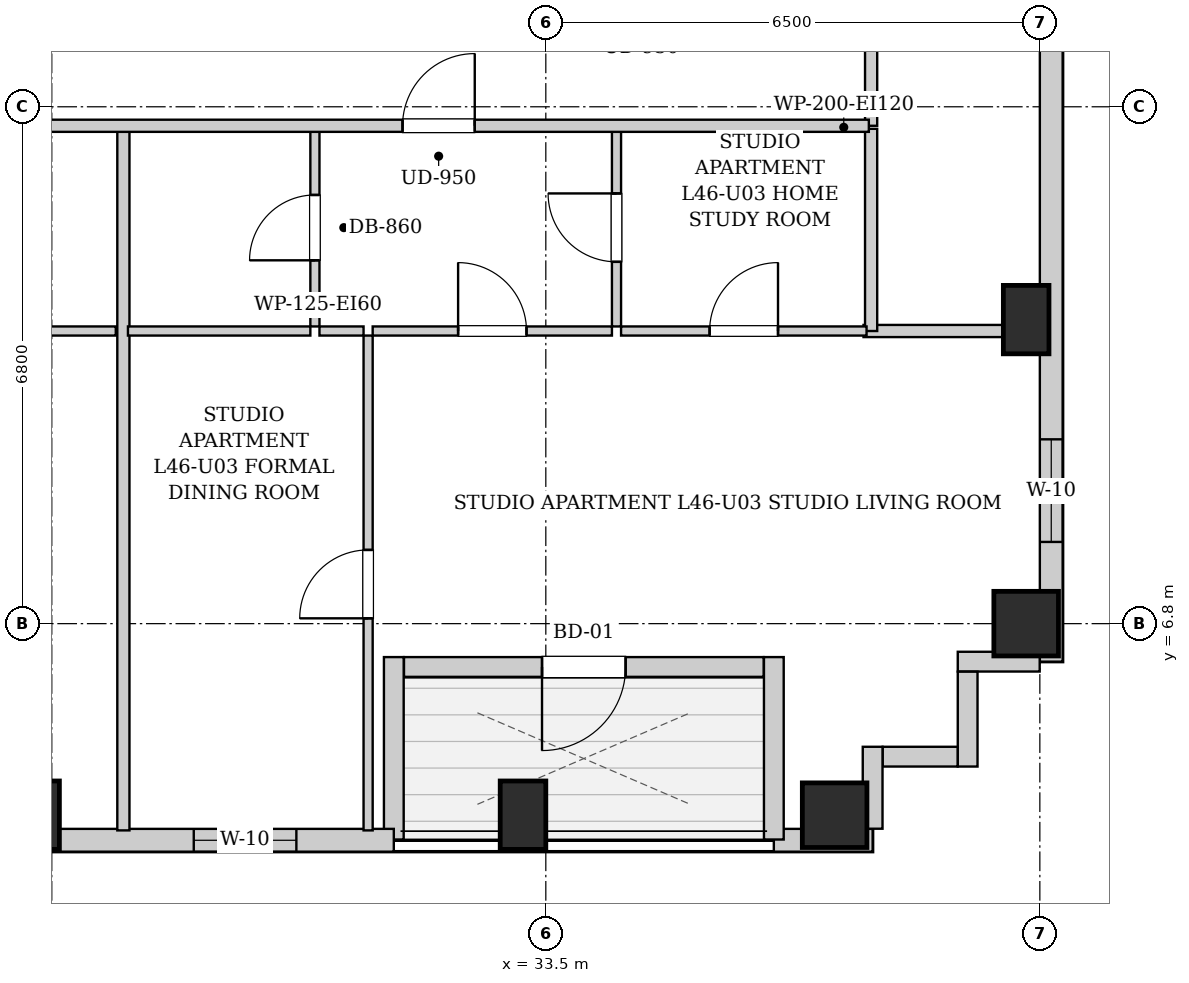
"""IFC4 building model, lengths in metres.
Left out: names, types, materials, properties, quantities, classifications, styles, units other than length and angle.
Written with IfcOpenShell. Run it as: python <this file> out.ifc"""

import sys

from ifc_helpers import new_model, si_unit, direction, frame, frame_2d, origin, origin_2d, place, context, subcontext, project, spatial, rectangle, extrude, element, fill, save


model = new_model("IFC4")
c1 = context("Model", 3, precision=1e-05, world=origin(), true_north=direction((0.0, 1.0)))
c2 = subcontext(c1, "Body", "Model", "MODEL_VIEW")
j1 = project(units=[si_unit("LENGTHUNIT", "METRE"), si_unit("PLANEANGLEUNIT", "RADIAN")], contexts=[c1])
p1 = place(None, origin())
s1 = spatial("IfcSite", under=j1, at=p1, CompositionType="ELEMENT")
p2 = place(p1, origin())
s2 = spatial("IfcBuilding", under=s1, at=p2, CompositionType="ELEMENT")
p3 = place(p2, frame((0.0, 0.0, 160.15)))
s3 = spatial("IfcBuildingStorey", under=s2, at=p3, CompositionType="ELEMENT", Elevation=160.15)
for number, where, z_axis, x_axis in (
    (1, (26.8, 4.28, 0.0), (0.0, 0.0, 1.0), (1.0, 0.0, 0.0)),
    (2, (33.2, 4.28, 0.0), (0.0, 0.0, 1.0), (1.0, 0.0, 0.0)),
):
    element("IfcColumn", number, at=place(p3, frame(where, z_axis=z_axis, x_axis=x_axis)), inside=s3, PredefinedType="COLUMN", context=c2, shape_type="SweptSolid", body=[
        extrude(rectangle(XDim=0.6, YDim=0.9, at=origin_2d()), origin(), (0.0, 0.0, 1.0), 3.25),
    ])
for number, where, z_axis, x_axis in (
    (3, (37.3, 4.28, 0.0), (0.0, 0.0, 1.0), (1.0, 0.0, 0.0)),
    (4, (39.82, 6.8, 0.0), (0.0, 0.0, 1.0), (1.0, 0.0, 0.0)),
):
    element("IfcColumn", number, at=place(p3, frame(where, z_axis=z_axis, x_axis=x_axis)), inside=s3, PredefinedType="COLUMN", context=c2, shape_type="SweptSolid", body=[
        extrude(rectangle(XDim=0.85, YDim=0.85, at=origin_2d()), origin(), (0.0, 0.0, 1.0), 3.25),
    ])
p4 = place(p3, frame((39.82, 10.8, 0.0), z_axis=(0.0, 0.0, 1.0), x_axis=(1.0, 0.0, 0.0)))
e5 = element("IfcColumn", 5, at=p4, inside=s3, PredefinedType="COLUMN", context=c2, shape_type="SweptSolid", body=[
    extrude(rectangle(XDim=0.6, YDim=0.9, at=origin_2d()), origin(), (0.0, 0.0, 1.0), 3.25),
])
p5 = place(p3, frame((40.15, 40.8, 0.0), z_axis=(0.0, 0.0, 1.0), x_axis=(0.0, -1.0, 0.0)))
e6 = element("IfcWall", 6, at=p5, inside=s3, PredefinedType="SOLIDWALL", context=c2, shape_type="SweptSolid", body=[
    extrude(rectangle(XDim=34.5, YDim=0.3, at=frame_2d((17.25, 0.0))), origin(), (0.0, 0.0, 1.0), 2.99),
])
p6 = place(p5, frame((31.575, 0.0, 0.55)))
e7 = element("IfcOpeningElement", 7, at=p6, cuts=e6, PredefinedType="OPENING", context=c2, shape_type="SweptSolid", body=[
    extrude(rectangle(XDim=1.35, YDim=1.2, at=frame_2d((0.675, 0.6))), frame((0.0, 0.16, 0.0), z_axis=(0.0, -1.0, 0.0), x_axis=(1.0, 0.0, 0.0)), (0.0, 0.0, 1.0), 0.32),
])
p7 = place(p5, frame((3.075, 0.0, 0.55)))
e8 = element("IfcOpeningElement", 8, at=p7, cuts=e6, PredefinedType="OPENING", context=c2, shape_type="SweptSolid", body=[
    extrude(rectangle(XDim=1.35, YDim=1.2, at=frame_2d((0.675, 0.6))), frame((0.0, 0.16, 0.0), z_axis=(0.0, -1.0, 0.0), x_axis=(1.0, 0.0, 0.0)), (0.0, 0.0, 1.0), 0.32),
])
p8 = place(p5, frame((1.085, 0.0, 0.55)))
e9 = element("IfcOpeningElement", 9, at=p8, cuts=e6, PredefinedType="OPENING", context=c2, shape_type="SweptSolid", body=[
    extrude(rectangle(XDim=1.35, YDim=1.2, at=frame_2d((0.675, 0.6))), frame((0.0, 0.16, 0.0), z_axis=(0.0, -1.0, 0.0), x_axis=(1.0, 0.0, 0.0)), (0.0, 0.0, 1.0), 0.32),
])
p9 = place(p5, frame((22.8, 0.0, 0.55)))
e10 = element("IfcOpeningElement", 10, at=p9, cuts=e6, PredefinedType="OPENING", context=c2, shape_type="SweptSolid", body=[
    extrude(rectangle(XDim=1.35, YDim=1.2, at=frame_2d((0.675, 0.6))), frame((0.0, 0.16, 0.0), z_axis=(0.0, -1.0, 0.0), x_axis=(1.0, 0.0, 0.0)), (0.0, 0.0, 1.0), 0.32),
])
p10 = place(p5, frame((13.425, 0.0, 0.55)))
e11 = element("IfcOpeningElement", 11, at=p10, cuts=e6, PredefinedType="OPENING", context=c2, shape_type="SweptSolid", body=[
    extrude(rectangle(XDim=1.35, YDim=1.2, at=frame_2d((0.675, 0.6))), frame((0.0, 0.16, 0.0), z_axis=(0.0, -1.0, 0.0), x_axis=(1.0, 0.0, 0.0)), (0.0, 0.0, 1.0), 0.32),
])
p11 = place(p3, frame((37.8, 3.95, 0.0), z_axis=(0.0, 0.0, 1.0), x_axis=(-1.0, 0.0, 0.0)))
e12 = element("IfcWall", 12, at=p11, inside=s3, PredefinedType="SOLIDWALL", context=c2, shape_type="SweptSolid", body=[
    extrude(rectangle(XDim=1.3, YDim=0.3, at=frame_2d((0.65, 0.0))), origin(), (0.0, 0.0, 1.0), 2.99),
])
p12 = place(p3, frame((36.5, 3.96, 0.0), z_axis=(0.0, 0.0, 1.0), x_axis=(0.0, 1.0, 0.0)))
e13 = element("IfcWall", 13, at=p12, inside=s3, PredefinedType="SOLIDWALL", context=c2, shape_type="SweptSolid", body=[
    extrude(rectangle(XDim=2.4, YDim=0.26, at=frame_2d((1.2, 0.0))), origin(), (0.0, 0.0, 1.0), 2.99),
])
p13 = place(p3, frame((36.366, 6.23, 0.0), z_axis=(0.0, 0.0, 1.0), x_axis=(-1.0, 0.0, 0.0)))
e14 = element("IfcWall", 14, at=p13, inside=s3, PredefinedType="SOLIDWALL", context=c2, shape_type="SweptSolid", body=[
    extrude(rectangle(XDim=4.732, YDim=0.26, at=frame_2d((2.366, 0.0))), origin(), (0.0, 0.0, 1.0), 2.99),
])
p14 = place(p13, frame((1.816, 0.0, 0.0)))
e15 = element("IfcOpeningElement", 15, at=p14, cuts=e14, PredefinedType="OPENING", context=c2, shape_type="SweptSolid", body=[
    extrude(rectangle(XDim=1.1, YDim=2.0, at=frame_2d((0.55, 1.0))), frame((0.0, 0.14, 0.0), z_axis=(0.0, -1.0, 0.0), x_axis=(1.0, 0.0, 0.0)), (0.0, 0.0, 1.0), 0.28),
])
p15 = place(p3, frame((31.5, 6.36, 0.0), z_axis=(0.0, 0.0, 1.0), x_axis=(0.0, -1.0, 0.0)))
e16 = element("IfcWall", 16, at=p15, inside=s3, PredefinedType="SOLIDWALL", context=c2, shape_type="SweptSolid", body=[
    extrude(rectangle(XDim=2.4, YDim=0.26, at=frame_2d((1.2, 0.0))), origin(), (0.0, 0.0, 1.0), 2.99),
])
p16 = place(p3, frame((31.5, 3.95, 0.0), z_axis=(0.0, 0.0, 1.0), x_axis=(-1.0, 0.0, 0.0)))
e17 = element("IfcWall", 17, at=p16, inside=s3, PredefinedType="SOLIDWALL", context=c2, shape_type="SweptSolid", body=[
    extrude(rectangle(XDim=15.05, YDim=0.3, at=frame_2d((7.525, 0.0))), origin(), (0.0, 0.0, 1.0), 2.99),
])
p17 = place(p16, frame((10.989, 0.0, 0.55)))
e18 = element("IfcOpeningElement", 18, at=p17, cuts=e17, PredefinedType="OPENING", context=c2, shape_type="SweptSolid", body=[
    extrude(rectangle(XDim=1.35, YDim=1.2, at=frame_2d((0.675, 0.6))), frame((0.0, 0.16, 0.0), z_axis=(0.0, -1.0, 0.0), x_axis=(1.0, 0.0, 0.0)), (0.0, 0.0, 1.0), 0.32),
])
p18 = place(p16, frame((1.282, 0.0, 0.55)))
e19 = element("IfcOpeningElement", 19, at=p18, cuts=e17, PredefinedType="OPENING", context=c2, shape_type="SweptSolid", body=[
    extrude(rectangle(XDim=1.35, YDim=1.2, at=frame_2d((0.675, 0.6))), frame((0.0, 0.16, 0.0), z_axis=(0.0, -1.0, 0.0), x_axis=(1.0, 0.0, 0.0)), (0.0, 0.0, 1.0), 0.32),
])
p19 = place(p3, frame((39.998, 6.3, 0.0), z_axis=(0.0, 0.0, 1.0), x_axis=(-1.0, 0.0, 0.0)))
e20 = element("IfcWall", 20, at=p19, inside=s3, PredefinedType="SOLIDWALL", context=c2, shape_type="SweptSolid", body=[
    extrude(rectangle(XDim=1.078, YDim=0.26, at=frame_2d((0.539, 0.0))), origin(), (0.0, 0.0, 1.0), 2.99),
])
p20 = place(p3, frame((39.05, 6.168, 0.0), z_axis=(0.0, 0.0, 1.0), x_axis=(0.0, -1.0, 0.0)))
e21 = element("IfcWall", 21, at=p20, inside=s3, PredefinedType="SOLIDWALL", context=c2, shape_type="SweptSolid", body=[
    extrude(rectangle(XDim=1.248, YDim=0.26, at=frame_2d((0.624, 0.0))), origin(), (0.0, 0.0, 1.0), 2.99),
])
p21 = place(p3, frame((38.918, 5.05, 0.0), z_axis=(0.0, 0.0, 1.0), x_axis=(-1.0, 0.0, 0.0)))
e22 = element("IfcWall", 22, at=p21, inside=s3, PredefinedType="SOLIDWALL", context=c2, shape_type="SweptSolid", body=[
    extrude(rectangle(XDim=0.986, YDim=0.26, at=frame_2d((0.493, 0.0))), origin(), (0.0, 0.0, 1.0), 2.99),
])
p22 = place(p3, frame((37.8, 5.18, 0.0), z_axis=(0.0, 0.0, 1.0), x_axis=(0.0, -1.0, 0.0)))
e23 = element("IfcWall", 23, at=p22, inside=s3, PredefinedType="SOLIDWALL", context=c2, shape_type="SweptSolid", body=[
    extrude(rectangle(XDim=1.078, YDim=0.26, at=frame_2d((0.539, 0.0))), origin(), (0.0, 0.0, 1.0), 2.99),
])
p23 = place(p3, frame((37.78, 13.35, 0.0), z_axis=(0.0, 0.0, 1.0), x_axis=(0.0, 1.0, 0.0)))
e24 = element("IfcWall", 24, at=p23, inside=s3, PredefinedType="PARTITIONING", context=c2, shape_type="SweptSolid", body=[
    extrude(rectangle(XDim=1.74, YDim=0.16, at=frame_2d((0.87, 0.0))), origin(), (0.0, 0.0, 1.0), 2.99),
])
p24 = place(p3, frame((23.938, 10.65, 0.0), z_axis=(0.0, 0.0, 1.0), x_axis=(1.0, 0.0, 0.0)))
e25 = element("IfcWall", 25, at=p24, inside=s3, PredefinedType="PARTITIONING", context=c2, shape_type="SweptSolid", body=[
    extrude(rectangle(XDim=3.904, YDim=0.12, at=frame_2d((1.952, 0.0))), origin(), (0.0, 0.0, 1.0), 2.99),
])
p25 = place(p24, frame((1.502, 0.0, 0.0)))
e26 = element("IfcOpeningElement", 26, at=p25, cuts=e25, PredefinedType="OPENING", context=c2, shape_type="SweptSolid", body=[
    extrude(rectangle(XDim=0.9, YDim=2.05, at=frame_2d((0.45, 1.025))), frame((0.0, 0.07, 0.0), z_axis=(0.0, -1.0, 0.0), x_axis=(1.0, 0.0, 0.0)), (0.0, 0.0, 1.0), 0.14),
])
p26 = place(p3, frame((37.68, 10.65, 0.0), z_axis=(0.0, 0.0, 1.0), x_axis=(1.0, 0.0, 0.0)))
e27 = element("IfcWall", 27, at=p26, inside=s3, PredefinedType="PARTITIONING", context=c2, shape_type="SweptSolid", body=[
    extrude(rectangle(XDim=2.34, YDim=0.16, at=frame_2d((1.17, 0.0))), origin(), (0.0, 0.0, 1.0), 2.99),
])
p27 = place(p3, frame((37.78, 10.65, 0.0), z_axis=(0.0, 0.0, 1.0), x_axis=(0.0, 1.0, 0.0)))
e28 = element("IfcWall", 28, at=p27, inside=s3, PredefinedType="PARTITIONING", context=c2, shape_type="SweptSolid", body=[
    extrude(rectangle(XDim=2.66, YDim=0.16, at=frame_2d((1.33, 0.0))), origin(), (0.0, 0.0, 1.0), 2.99),
])
p28 = place(p3, frame((27.942, 4.08, 0.0), z_axis=(0.0, 0.0, 1.0), x_axis=(0.0, 1.0, 0.0)))
e29 = element("IfcWall", 29, at=p28, inside=s3, PredefinedType="PARTITIONING", context=c2, shape_type="SweptSolid", body=[
    extrude(rectangle(XDim=9.23, YDim=0.16, at=frame_2d((4.615, 0.0))), origin(), (0.0, 0.0, 1.0), 2.99),
])
p29 = place(p3, frame((30.462, 10.71, 0.0), z_axis=(0.0, 0.0, 1.0), x_axis=(0.0, 1.0, 0.0)))
e30 = element("IfcWall", 30, at=p29, inside=s3, PredefinedType="PARTITIONING", context=c2, shape_type="SweptSolid", body=[
    extrude(rectangle(XDim=2.6, YDim=0.12, at=frame_2d((1.3, 0.0))), origin(), (0.0, 0.0, 1.0), 2.99),
])
p30 = place(p29, frame((0.87, 0.0, 0.0)))
e31 = element("IfcOpeningElement", 31, at=p30, cuts=e30, PredefinedType="OPENING", context=c2, shape_type="SweptSolid", body=[
    extrude(rectangle(XDim=0.86, YDim=2.05, at=frame_2d((0.43, 1.025))), frame((0.0, 0.07, 0.0), z_axis=(0.0, -1.0, 0.0), x_axis=(1.0, 0.0, 0.0)), (0.0, 0.0, 1.0), 0.14),
])
p31 = place(p3, frame((28.002, 10.65, 0.0), z_axis=(0.0, 0.0, 1.0), x_axis=(1.0, 0.0, 0.0)))
e32 = element("IfcWall", 32, at=p31, inside=s3, PredefinedType="PARTITIONING", context=c2, shape_type="SweptSolid", body=[
    extrude(rectangle(XDim=2.4, YDim=0.12, at=frame_2d((1.2, 0.0))), origin(), (0.0, 0.0, 1.0), 2.99),
])
p32 = place(p3, frame((34.43, 10.71, 0.0), z_axis=(0.0, 0.0, 1.0), x_axis=(0.0, 1.0, 0.0)))
e33 = element("IfcWall", 33, at=p32, inside=s3, PredefinedType="PARTITIONING", context=c2, shape_type="SweptSolid", body=[
    extrude(rectangle(XDim=2.6, YDim=0.12, at=frame_2d((1.3, 0.0))), origin(), (0.0, 0.0, 1.0), 2.99),
])
p33 = place(p32, frame((0.85, 0.0, 0.0)))
e34 = element("IfcOpeningElement", 34, at=p33, cuts=e33, PredefinedType="OPENING", context=c2, shape_type="SweptSolid", body=[
    extrude(rectangle(XDim=0.9, YDim=2.05, at=frame_2d((0.45, 1.025))), frame((0.0, 0.07, 0.0), z_axis=(0.0, -1.0, 0.0), x_axis=(1.0, 0.0, 0.0)), (0.0, 0.0, 1.0), 0.14),
])
p34 = place(p3, frame((30.522, 10.65, 0.0), z_axis=(0.0, 0.0, 1.0), x_axis=(1.0, 0.0, 0.0)))
e35 = element("IfcWall", 35, at=p34, inside=s3, PredefinedType="PARTITIONING", context=c2, shape_type="SweptSolid", body=[
    extrude(rectangle(XDim=0.58, YDim=0.12, at=frame_2d((0.29, 0.0))), origin(), (0.0, 0.0, 1.0), 2.99),
])
p35 = place(p3, frame((31.222, 10.65, 0.0), z_axis=(0.0, 0.0, 1.0), x_axis=(1.0, 0.0, 0.0)))
e36 = element("IfcWall", 36, at=p35, inside=s3, PredefinedType="PARTITIONING", context=c2, shape_type="SweptSolid", body=[
    extrude(rectangle(XDim=3.148, YDim=0.12, at=frame_2d((1.574, 0.0))), origin(), (0.0, 0.0, 1.0), 2.99),
])
p36 = place(p35, frame((1.124, 0.0, 0.0)))
e37 = element("IfcOpeningElement", 37, at=p36, cuts=e36, PredefinedType="OPENING", context=c2, shape_type="SweptSolid", body=[
    extrude(rectangle(XDim=0.9, YDim=2.05, at=frame_2d((0.45, 1.025))), frame((0.0, 0.07, 0.0), z_axis=(0.0, -1.0, 0.0), x_axis=(1.0, 0.0, 0.0)), (0.0, 0.0, 1.0), 0.14),
])
p37 = place(p3, frame((34.49, 10.65, 0.0), z_axis=(0.0, 0.0, 1.0), x_axis=(1.0, 0.0, 0.0)))
e38 = element("IfcWall", 38, at=p37, inside=s3, PredefinedType="PARTITIONING", context=c2, shape_type="SweptSolid", body=[
    extrude(rectangle(XDim=3.23, YDim=0.12, at=frame_2d((1.615, 0.0))), origin(), (0.0, 0.0, 1.0), 2.99),
])
p38 = place(p37, frame((1.165, 0.0, 0.0)))
e39 = element("IfcOpeningElement", 39, at=p38, cuts=e38, PredefinedType="OPENING", context=c2, shape_type="SweptSolid", body=[
    extrude(rectangle(XDim=0.9, YDim=2.05, at=frame_2d((0.45, 1.025))), frame((0.0, 0.07, 0.0), z_axis=(0.0, -1.0, 0.0), x_axis=(1.0, 0.0, 0.0)), (0.0, 0.0, 1.0), 0.14),
])
p39 = place(p3, frame((31.162, 4.08, 0.0), z_axis=(0.0, 0.0, 1.0), x_axis=(0.0, 1.0, 0.0)))
e40 = element("IfcWall", 40, at=p39, inside=s3, PredefinedType="PARTITIONING", context=c2, shape_type="SweptSolid", body=[
    extrude(rectangle(XDim=6.51, YDim=0.12, at=frame_2d((3.255, 0.0))), origin(), (0.0, 0.0, 1.0), 2.99),
])
p40 = place(p39, frame((2.79, 0.0, 0.0)))
e41 = element("IfcOpeningElement", 41, at=p40, cuts=e40, PredefinedType="OPENING", context=c2, shape_type="SweptSolid", body=[
    extrude(rectangle(XDim=0.9, YDim=2.05, at=frame_2d((0.45, 1.025))), frame((0.0, 0.07, 0.0), z_axis=(0.0, -1.0, 0.0), x_axis=(1.0, 0.0, 0.0)), (0.0, 0.0, 1.0), 0.14),
])
p41 = place(p3, frame((10.05, 13.35, 0.0), z_axis=(0.0, 0.0, 1.0), x_axis=(1.0, 0.0, 0.0)))
e42 = element("IfcWall", 42, at=p41, inside=s3, PredefinedType="PARTITIONING", context=c2, shape_type="SweptSolid", body=[
    extrude(rectangle(XDim=27.7, YDim=0.16, at=frame_2d((13.85, 0.0))), origin(), (0.0, 0.0, 1.0), 2.99),
])
p42 = place(p41, frame((4.715, 0.0, 0.0)))
e43 = element("IfcOpeningElement", 43, at=p42, cuts=e42, PredefinedType="OPENING", context=c2, shape_type="SweptSolid", body=[
    extrude(rectangle(XDim=0.95, YDim=2.1, at=frame_2d((0.475, 1.05))), frame((0.0, 0.09, 0.0), z_axis=(0.0, -1.0, 0.0), x_axis=(1.0, 0.0, 0.0)), (0.0, 0.0, 1.0), 0.18),
])
p43 = place(p41, frame((15.365, 0.0, 0.0)))
e44 = element("IfcOpeningElement", 44, at=p43, cuts=e42, PredefinedType="OPENING", context=c2, shape_type="SweptSolid", body=[
    extrude(rectangle(XDim=0.95, YDim=2.1, at=frame_2d((0.475, 1.05))), frame((0.0, 0.09, 0.0), z_axis=(0.0, -1.0, 0.0), x_axis=(1.0, 0.0, 0.0)), (0.0, 0.0, 1.0), 0.18),
])
p44 = place(p41, frame((21.565, 0.0, 0.0)))
e45 = element("IfcOpeningElement", 45, at=p44, cuts=e42, PredefinedType="OPENING", context=c2, shape_type="SweptSolid", body=[
    extrude(rectangle(XDim=0.95, YDim=2.1, at=frame_2d((0.475, 1.05))), frame((0.0, 0.09, 0.0), z_axis=(0.0, -1.0, 0.0), x_axis=(1.0, 0.0, 0.0)), (0.0, 0.0, 1.0), 0.18),
])
p45 = place(p30, origin())
e46 = element("IfcDoor", 46, at=p45, inside=s3, OperationType="SINGLE_SWING_LEFT", PredefinedType="DOOR", context=c2, shape_type="SweptSolid", body=[
    extrude(rectangle(XDim=0.86, YDim=2.05, at=frame_2d((0.43, 1.025))), frame((0.0, 0.025, 0.0), z_axis=(0.0, -1.0, 0.0), x_axis=(1.0, 0.0, 0.0)), (0.0, 0.0, 1.0), 0.05),
])
fill(e31, e46)
p46 = place(p33, origin())
e47 = element("IfcDoor", 47, at=p46, inside=s3, OperationType="SINGLE_SWING_RIGHT", PredefinedType="DOOR", context=c2, shape_type="SweptSolid", body=[
    extrude(rectangle(XDim=0.9, YDim=2.05, at=frame_2d((0.45, 1.025))), frame((0.0, 0.025, 0.0), z_axis=(0.0, -1.0, 0.0), x_axis=(1.0, 0.0, 0.0)), (0.0, 0.0, 1.0), 0.05),
])
fill(e34, e47)
p47 = place(p36, origin())
e48 = element("IfcDoor", 48, at=p47, inside=s3, OperationType="SINGLE_SWING_LEFT", PredefinedType="DOOR", context=c2, shape_type="SweptSolid", body=[
    extrude(rectangle(XDim=0.9, YDim=2.05, at=frame_2d((0.45, 1.025))), frame((0.0, 0.025, 0.0), z_axis=(0.0, -1.0, 0.0), x_axis=(1.0, 0.0, 0.0)), (0.0, 0.0, 1.0), 0.05),
])
fill(e37, e48)
p48 = place(p38, origin())
e49 = element("IfcDoor", 49, at=p48, inside=s3, OperationType="SINGLE_SWING_RIGHT", PredefinedType="DOOR", context=c2, shape_type="SweptSolid", body=[
    extrude(rectangle(XDim=0.9, YDim=2.05, at=frame_2d((0.45, 1.025))), frame((0.0, 0.025, 0.0), z_axis=(0.0, -1.0, 0.0), x_axis=(1.0, 0.0, 0.0)), (0.0, 0.0, 1.0), 0.05),
])
fill(e39, e49)
p49 = place(p40, origin())
e50 = element("IfcDoor", 50, at=p49, inside=s3, OperationType="SINGLE_SWING_LEFT", PredefinedType="DOOR", context=c2, shape_type="SweptSolid", body=[
    extrude(rectangle(XDim=0.9, YDim=2.05, at=frame_2d((0.45, 1.025))), frame((0.0, 0.025, 0.0), z_axis=(0.0, -1.0, 0.0), x_axis=(1.0, 0.0, 0.0)), (0.0, 0.0, 1.0), 0.05),
])
fill(e41, e50)
p50 = place(p44, origin())
e51 = element("IfcDoor", 51, at=p50, inside=s3, OperationType="SINGLE_SWING_RIGHT", PredefinedType="DOOR", context=c2, shape_type="SweptSolid", body=[
    extrude(rectangle(XDim=0.95, YDim=2.1, at=frame_2d((0.475, 1.05))), frame((0.0, 0.025, 0.0), z_axis=(0.0, -1.0, 0.0), x_axis=(1.0, 0.0, 0.0)), (0.0, 0.0, 1.0), 0.05),
])
fill(e45, e51)
p51 = place(p14, origin())
e52 = element("IfcDoor", 52, at=p51, inside=s3, OperationType="SINGLE_SWING_RIGHT", PredefinedType="DOOR", context=c2, shape_type="SweptSolid", body=[
    extrude(rectangle(XDim=1.1, YDim=2.0, at=frame_2d((0.55, 1.0))), frame((0.0, 0.025, 0.0), z_axis=(0.0, -1.0, 0.0), x_axis=(1.0, 0.0, 0.0)), (0.0, 0.0, 1.0), 0.05),
])
fill(e15, e52)
p52 = place(p18, origin())
e53 = element("IfcWindow", 53, at=p52, inside=s3, PartitioningType="SINGLE_PANEL", PredefinedType="WINDOW", context=c2, shape_type="SweptSolid", body=[
    extrude(rectangle(XDim=1.35, YDim=1.2, at=frame_2d((0.675, 0.6))), frame((0.0, 0.03, 0.0), z_axis=(0.0, -1.0, 0.0), x_axis=(1.0, 0.0, 0.0)), (0.0, 0.0, 1.0), 0.06),
])
fill(e19, e53)
p53 = place(p6, origin())
e54 = element("IfcWindow", 54, at=p53, inside=s3, PartitioningType="SINGLE_PANEL", PredefinedType="WINDOW", context=c2, shape_type="SweptSolid", body=[
    extrude(rectangle(XDim=1.35, YDim=1.2, at=frame_2d((0.675, 0.6))), frame((0.0, 0.03, 0.0), z_axis=(0.0, -1.0, 0.0), x_axis=(1.0, 0.0, 0.0)), (0.0, 0.0, 1.0), 0.06),
])
fill(e7, e54)
save(model, sys.argv[1])
